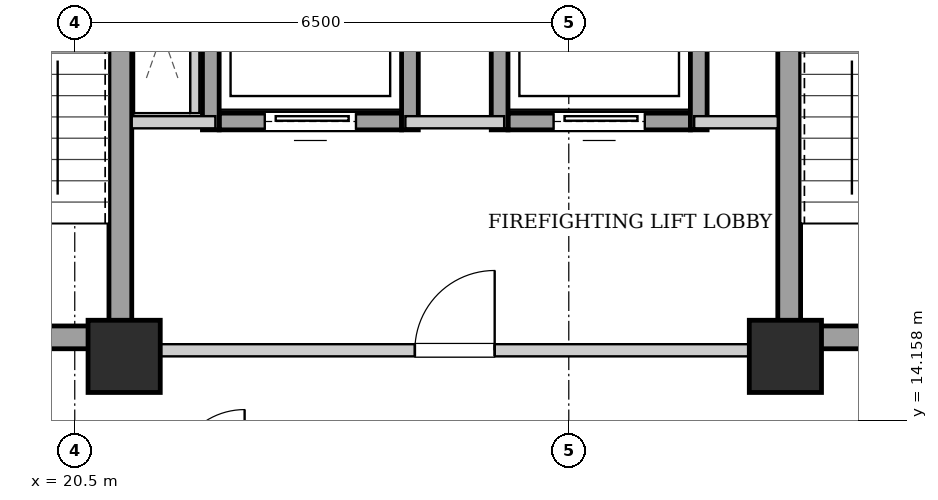
"""IFC4 building model, lengths in metres.
Left out: names, types, materials, properties, quantities, classifications, styles, units other than length and angle.
Written with IfcOpenShell. Run it as: python <this file> out.ifc"""

import sys

from ifc_helpers import new_model, si_unit, direction, frame, frame_2d, origin, origin_2d, place, context, subcontext, project, spatial, rectangle, extrude, element, fill, save


model = new_model("IFC4")
c1 = context("Model", 3, precision=1e-05, world=origin(), true_north=direction((0.0, 1.0)))
c2 = subcontext(c1, "Body", "Model", "MODEL_VIEW")
j1 = project(units=[si_unit("LENGTHUNIT", "METRE"), si_unit("PLANEANGLEUNIT", "RADIAN")], contexts=[c1])
p1 = place(None, origin())
s1 = spatial("IfcSite", under=j1, at=p1, CompositionType="ELEMENT")
p2 = place(p1, origin())
s2 = spatial("IfcBuilding", under=s1, at=p2, CompositionType="ELEMENT")
p3 = place(p2, frame((0.0, 0.0, 143.9)))
s3 = spatial("IfcBuildingStorey", under=s2, at=p3, CompositionType="ELEMENT", Elevation=143.9)
for number, where, z_axis, x_axis in (
    (1, (21.15, 15.0, 0.0), (0.0, 0.0, 1.0), (1.0, 0.0, 0.0)),
    (2, (29.85, 15.0, 0.0), (0.0, 0.0, 1.0), (1.0, 0.0, 0.0)),
):
    element("IfcColumn", number, at=place(p3, frame(where, z_axis=z_axis, x_axis=x_axis)), inside=s3, PredefinedType="COLUMN", context=c2, shape_type="SweptSolid", body=[
        extrude(rectangle(XDim=0.95, YDim=0.95, at=origin_2d()), origin(), (0.0, 0.0, 1.0), 3.25),
    ])
p4 = place(p3, frame((21.1, 15.1, 0.0), z_axis=(0.0, 0.0, 1.0), x_axis=(0.0, 1.0, 0.0)))
e3 = element("IfcWall", 3, at=p4, inside=s3, PredefinedType="SHEAR", context=c2, shape_type="SweptSolid", body=[
    extrude(rectangle(XDim=9.0, YDim=0.3, at=frame_2d((4.5, 0.0))), origin(), (0.0, 0.0, 1.0), 2.99),
])
p5 = place(p3, frame((18.1, 15.25, 0.0), z_axis=(0.0, 0.0, 1.0), x_axis=(1.0, 0.0, 0.0)))
e4 = element("IfcWall", 4, at=p5, inside=s3, PredefinedType="SHEAR", context=c2, shape_type="SweptSolid", body=[
    extrude(rectangle(XDim=2.85, YDim=0.3, at=frame_2d((1.425, 0.0))), origin(), (0.0, 0.0, 1.0), 2.99),
])
p6 = place(p5, frame((0.86, 0.0, 0.0)))
e5 = element("IfcOpeningElement", 5, at=p6, cuts=e4, PredefinedType="OPENING", context=c2, shape_type="SweptSolid", body=[
    extrude(rectangle(XDim=1.1, YDim=2.05, at=frame_2d((0.55, 1.025))), frame((0.0, 0.16, 0.0), z_axis=(0.0, -1.0, 0.0), x_axis=(1.0, 0.0, 0.0)), (0.0, 0.0, 1.0), 0.32),
])
p7 = place(p3, frame((29.9, 15.1, 0.0), z_axis=(0.0, 0.0, 1.0), x_axis=(0.0, 1.0, 0.0)))
e6 = element("IfcWall", 6, at=p7, inside=s3, PredefinedType="SHEAR", context=c2, shape_type="SweptSolid", body=[
    extrude(rectangle(XDim=9.0, YDim=0.3, at=frame_2d((4.5, 0.0))), origin(), (0.0, 0.0, 1.0), 2.99),
])
p8 = place(p3, frame((30.05, 15.25, 0.0), z_axis=(0.0, 0.0, 1.0), x_axis=(1.0, 0.0, 0.0)))
e7 = element("IfcWall", 7, at=p8, inside=s3, PredefinedType="SHEAR", context=c2, shape_type="SweptSolid", body=[
    extrude(rectangle(XDim=2.85, YDim=0.3, at=frame_2d((1.425, 0.0))), origin(), (0.0, 0.0, 1.0), 2.99),
])
p9 = place(p8, frame((0.86, 0.0, 0.0)))
e8 = element("IfcOpeningElement", 8, at=p9, cuts=e7, PredefinedType="OPENING", context=c2, shape_type="SweptSolid", body=[
    extrude(rectangle(XDim=1.1, YDim=2.05, at=frame_2d((0.55, 1.025))), frame((0.0, 0.16, 0.0), z_axis=(0.0, -1.0, 0.0), x_axis=(1.0, 0.0, 0.0)), (0.0, 0.0, 1.0), 0.32),
])
p10 = place(p3, frame((22.4, 18.09, 0.0), z_axis=(0.0, 0.0, 1.0), x_axis=(1.0, 0.0, 0.0)))
e9 = element("IfcWall", 9, at=p10, inside=s3, PredefinedType="SHEAR", context=c2, shape_type="SweptSolid", body=[
    extrude(rectangle(XDim=2.4, YDim=0.22, at=frame_2d((1.2, 0.0))), origin(), (0.0, 0.0, 1.0), 2.99),
])
p11 = place(p10, frame((0.6, 0.0, 0.0)))
e10 = element("IfcOpeningElement", 10, at=p11, cuts=e9, PredefinedType="OPENING", context=c2, shape_type="SweptSolid", body=[
    extrude(rectangle(XDim=1.2, YDim=2.15, at=frame_2d((0.6, 1.075))), frame((0.0, 0.12, 0.0), z_axis=(0.0, -1.0, 0.0), x_axis=(1.0, 0.0, 0.0)), (0.0, 0.0, 1.0), 0.24),
])
for number, where, z_axis, x_axis in (
    (11, (22.29, 17.98, 0.0), (0.0, 0.0, 1.0), (0.0, 1.0, 0.0)),
    (12, (24.91, 17.98, 0.0), (0.0, 0.0, 1.0), (0.0, 1.0, 0.0)),
):
    element("IfcWall", number, at=place(p3, frame(where, z_axis=z_axis, x_axis=x_axis)), inside=s3, PredefinedType="SHEAR", context=c2, shape_type="SweptSolid", body=[
        extrude(rectangle(XDim=2.54, YDim=0.22, at=frame_2d((1.27, 0.0))), origin(), (0.0, 0.0, 1.0), 2.99),
    ])
p12 = place(p3, frame((26.2, 18.09, 0.0), z_axis=(0.0, 0.0, 1.0), x_axis=(1.0, 0.0, 0.0)))
e13 = element("IfcWall", 13, at=p12, inside=s3, PredefinedType="SHEAR", context=c2, shape_type="SweptSolid", body=[
    extrude(rectangle(XDim=2.4, YDim=0.22, at=frame_2d((1.2, 0.0))), origin(), (0.0, 0.0, 1.0), 2.99),
])
p13 = place(p12, frame((0.6, 0.0, 0.0)))
e14 = element("IfcOpeningElement", 14, at=p13, cuts=e13, PredefinedType="OPENING", context=c2, shape_type="SweptSolid", body=[
    extrude(rectangle(XDim=1.2, YDim=2.15, at=frame_2d((0.6, 1.075))), frame((0.0, 0.12, 0.0), z_axis=(0.0, -1.0, 0.0), x_axis=(1.0, 0.0, 0.0)), (0.0, 0.0, 1.0), 0.24),
])
for number, where, z_axis, x_axis in (
    (15, (26.09, 17.98, 0.0), (0.0, 0.0, 1.0), (0.0, 1.0, 0.0)),
    (16, (28.71, 17.98, 0.0), (0.0, 0.0, 1.0), (0.0, 1.0, 0.0)),
):
    element("IfcWall", number, at=place(p3, frame(where, z_axis=z_axis, x_axis=x_axis)), inside=s3, PredefinedType="SHEAR", context=c2, shape_type="SweptSolid", body=[
        extrude(rectangle(XDim=2.54, YDim=0.22, at=frame_2d((1.27, 0.0))), origin(), (0.0, 0.0, 1.0), 2.99),
    ])
p14 = place(p3, frame((21.25, 15.08, 0.0), z_axis=(0.0, 0.0, 1.0), x_axis=(1.0, 0.0, 0.0)))
e17 = element("IfcWall", 17, at=p14, inside=s3, PredefinedType="PARTITIONING", context=c2, shape_type="SweptSolid", body=[
    extrude(rectangle(XDim=8.5, YDim=0.16, at=frame_2d((4.25, 0.0))), origin(), (0.0, 0.0, 1.0), 2.426),
])
p15 = place(p14, frame((3.725, 0.0, 0.0)))
e18 = element("IfcOpeningElement", 18, at=p15, cuts=e17, PredefinedType="OPENING", context=c2, shape_type="SweptSolid", body=[
    extrude(rectangle(XDim=1.05, YDim=2.05, at=frame_2d((0.525, 1.025))), frame((0.0, 0.09, 0.0), z_axis=(0.0, -1.0, 0.0), x_axis=(1.0, 0.0, 0.0)), (0.0, 0.0, 1.0), 0.18),
])
p16 = place(p3, frame((21.25, 18.08, 0.0), z_axis=(0.0, 0.0, 1.0), x_axis=(1.0, 0.0, 0.0)))
e19 = element("IfcWall", 19, at=p16, inside=s3, PredefinedType="PARTITIONING", context=c2, shape_type="SweptSolid", body=[
    extrude(rectangle(XDim=1.1, YDim=0.16, at=frame_2d((0.55, 0.0))), origin(), (0.0, 0.0, 1.0), 2.99),
])
p17 = place(p3, frame((24.85, 18.08, 0.0), z_axis=(0.0, 0.0, 1.0), x_axis=(1.0, 0.0, 0.0)))
e20 = element("IfcWall", 20, at=p17, inside=s3, PredefinedType="PARTITIONING", context=c2, shape_type="SweptSolid", body=[
    extrude(rectangle(XDim=1.3, YDim=0.16, at=frame_2d((0.65, 0.0))), origin(), (0.0, 0.0, 1.0), 2.99),
])
p18 = place(p3, frame((28.65, 18.08, 0.0), z_axis=(0.0, 0.0, 1.0), x_axis=(1.0, 0.0, 0.0)))
e21 = element("IfcWall", 21, at=p18, inside=s3, PredefinedType="PARTITIONING", context=c2, shape_type="SweptSolid", body=[
    extrude(rectangle(XDim=1.1, YDim=0.16, at=frame_2d((0.55, 0.0))), origin(), (0.0, 0.0, 1.0), 2.99),
])
p19 = place(p3, frame((22.08, 18.2, 0.0), z_axis=(0.0, 0.0, 1.0), x_axis=(0.0, 1.0, 0.0)))
e22 = element("IfcWall", 22, at=p19, inside=s3, PredefinedType="PARTITIONING", context=c2, shape_type="SweptSolid", body=[
    extrude(rectangle(XDim=2.12, YDim=0.12, at=frame_2d((1.06, 0.0))), origin(), (0.0, 0.0, 1.0), 2.99),
])
p20 = place(p11, origin())
e23 = element("IfcDoor", 23, at=p20, inside=s3, OperationType="SLIDING_TO_LEFT", PredefinedType="DOOR", context=c2, shape_type="SweptSolid", body=[
    extrude(rectangle(XDim=1.2, YDim=2.15, at=frame_2d((0.6, 1.075))), frame((0.0, 0.025, 0.0), z_axis=(0.0, -1.0, 0.0), x_axis=(1.0, 0.0, 0.0)), (0.0, 0.0, 1.0), 0.05),
])
fill(e10, e23)
p21 = place(p13, origin())
e24 = element("IfcDoor", 24, at=p21, inside=s3, OperationType="SLIDING_TO_LEFT", PredefinedType="DOOR", context=c2, shape_type="SweptSolid", body=[
    extrude(rectangle(XDim=1.2, YDim=2.15, at=frame_2d((0.6, 1.075))), frame((0.0, 0.025, 0.0), z_axis=(0.0, -1.0, 0.0), x_axis=(1.0, 0.0, 0.0)), (0.0, 0.0, 1.0), 0.05),
])
fill(e14, e24)
p22 = place(p15, origin())
e25 = element("IfcDoor", 25, at=p22, inside=s3, OperationType="SINGLE_SWING_RIGHT", PredefinedType="DOOR", context=c2, shape_type="SweptSolid", body=[
    extrude(rectangle(XDim=1.05, YDim=2.05, at=frame_2d((0.525, 1.025))), frame((0.0, 0.025, 0.0), z_axis=(0.0, -1.0, 0.0), x_axis=(1.0, 0.0, 0.0)), (0.0, 0.0, 1.0), 0.05),
])
fill(e18, e25)
save(model, sys.argv[1])
